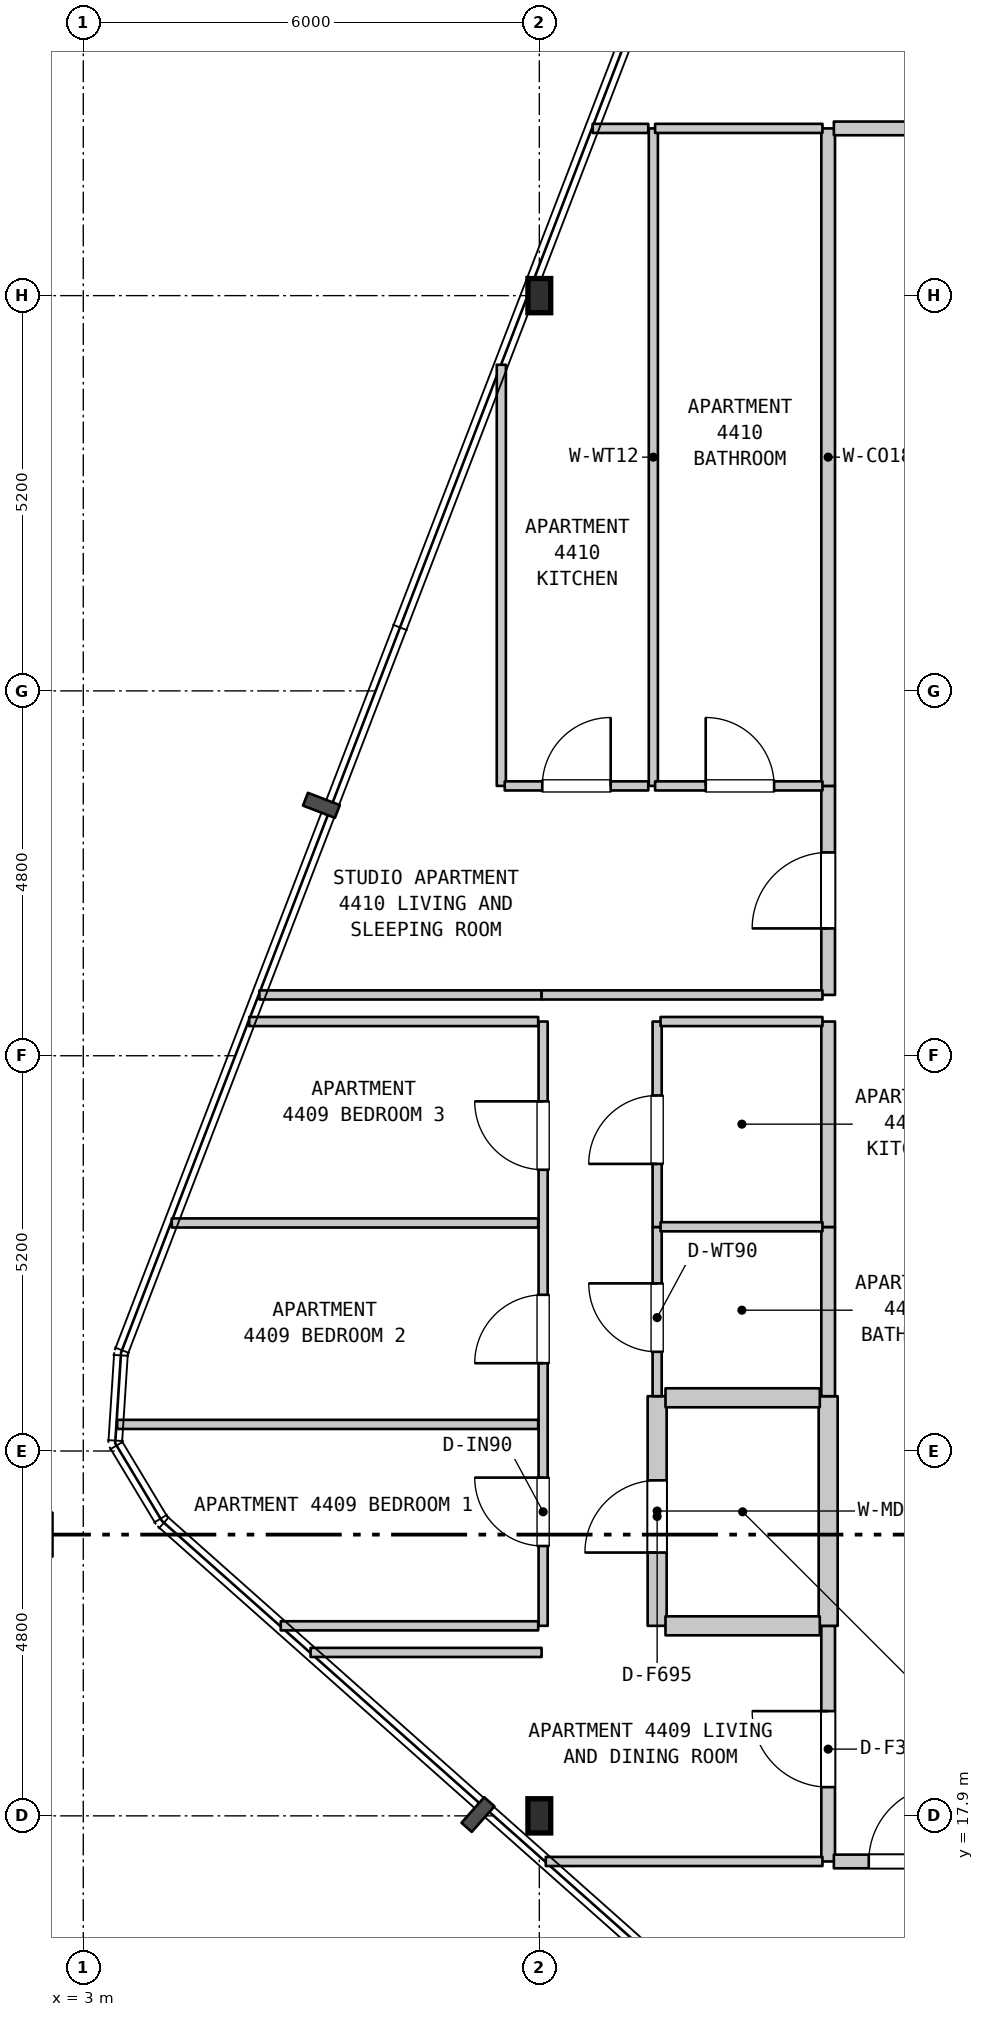
"""IFC4 building model, lengths in metres.
Left out: names, types, materials, properties, quantities, classifications, styles, units other than length and angle.
Written with IfcOpenShell. Run it as: python <this file> out.ifc"""

import sys

from ifc_helpers import new_model, si_unit, direction, frame, frame_2d, origin, origin_2d, place, context, subcontext, project, spatial, rectangle, i_section, extrude, element, fill, save


model = new_model("IFC4")
c1 = context("Model", 3, precision=1e-05, world=origin(), true_north=direction((0.0, 1.0)))
c2 = subcontext(c1, "Body", "Model", "MODEL_VIEW")
j1 = project(units=[si_unit("LENGTHUNIT", "METRE"), si_unit("PLANEANGLEUNIT", "RADIAN")], contexts=[c1])
p1 = place(None, origin())
s1 = spatial("IfcSite", under=j1, at=p1, CompositionType="ELEMENT")
p2 = place(p1, origin())
s2 = spatial("IfcBuilding", under=s1, at=p2, CompositionType="ELEMENT")
p3 = place(p2, frame((0.0, 0.0, 180.2)))
s3 = spatial("IfcBuildingStorey", under=s2, at=p3, CompositionType="ELEMENT", Elevation=180.2)
for number, where, z_axis, x_axis in (
    (1, (9.0, 17.9, 0.0), (0.0, 0.0, 1.0), (1.0, 0.0, 0.0)),
    (2, (9.0, 37.9, 0.0), (0.0, 0.0, 1.0), (1.0, 0.0, 0.0)),
):
    element("IfcColumn", number, at=place(p3, frame(where, z_axis=z_axis, x_axis=x_axis)), inside=s3, PredefinedType="COLUMN", context=c2, shape_type="SweptSolid", body=[
        extrude(i_section(OverallWidth=0.3, OverallDepth=0.45, WebThickness=0.014, FlangeThickness=0.026, FilletRadius=0.027, at=origin_2d()), origin(), (0.0, 0.0, 1.0), 3.7),
    ])
p4 = place(p3, frame((8.5, 31.45, 0.0), z_axis=(0.0, 0.0, 1.0), x_axis=(0.0, 1.0, 0.0)))
e3 = element("IfcWall", 3, at=p4, inside=s3, PredefinedType="PARTITIONING", context=c2, shape_type="SweptSolid", body=[
    extrude(rectangle(XDim=5.54, YDim=0.12, at=frame_2d((2.77, 0.0))), origin(), (0.0, 0.0, 1.0), 3.38),
])
p5 = place(p3, frame((9.05, 20.4, 0.0), z_axis=(0.0, 0.0, 1.0), x_axis=(0.0, 1.0, 0.0)))
e4 = element("IfcWall", 4, at=p5, inside=s3, PredefinedType="PARTITIONING", context=c2, shape_type="SweptSolid", body=[
    extrude(rectangle(XDim=7.95, YDim=0.12, at=frame_2d((3.975, 0.0))), origin(), (0.0, 0.0, 1.0), 2.78),
])
p6 = place(p5, frame((1.05, 0.0, 0.0)))
e5 = element("IfcOpeningElement", 5, at=p6, cuts=e4, PredefinedType="OPENING", context=c2, shape_type="SweptSolid", body=[
    extrude(rectangle(XDim=0.9, YDim=2.15, at=frame_2d((0.45, 1.075))), frame((0.0, 0.07, 0.0), z_axis=(0.0, -1.0, 0.0), x_axis=(1.0, 0.0, 0.0)), (0.0, 0.0, 1.0), 0.14),
])
p7 = place(p5, frame((3.455, 0.0, 0.0)))
e6 = element("IfcOpeningElement", 6, at=p7, cuts=e4, PredefinedType="OPENING", context=c2, shape_type="SweptSolid", body=[
    extrude(rectangle(XDim=0.9, YDim=2.15, at=frame_2d((0.45, 1.075))), frame((0.0, 0.07, 0.0), z_axis=(0.0, -1.0, 0.0), x_axis=(1.0, 0.0, 0.0)), (0.0, 0.0, 1.0), 0.14),
])
p8 = place(p5, frame((6.0, 0.0, 0.0)))
e7 = element("IfcOpeningElement", 7, at=p8, cuts=e4, PredefinedType="OPENING", context=c2, shape_type="SweptSolid", body=[
    extrude(rectangle(XDim=0.9, YDim=2.15, at=frame_2d((0.45, 1.075))), frame((0.0, 0.07, 0.0), z_axis=(0.0, -1.0, 0.0), x_axis=(1.0, 0.0, 0.0)), (0.0, 0.0, 1.0), 0.14),
])
p9 = place(p3, frame((10.5, 31.45, 0.0), z_axis=(0.0, 0.0, 1.0), x_axis=(0.0, 1.0, 0.0)))
e8 = element("IfcWall", 8, at=p9, inside=s3, PredefinedType="PARTITIONING", context=c2, shape_type="SweptSolid", body=[
    extrude(rectangle(XDim=8.65, YDim=0.12, at=frame_2d((4.325, 0.0))), origin(), (0.0, 0.0, 1.0), 3.38),
])
p10 = place(p3, frame((10.55, 20.4, 0.0), z_axis=(0.0, 0.0, 1.0), x_axis=(0.0, 1.0, 0.0)))
e9 = element("IfcWall", 9, at=p10, inside=s3, PredefinedType="STANDARD", context=c2, shape_type="SweptSolid", body=[
    extrude(rectangle(XDim=3.021, YDim=0.25, at=frame_2d((1.51, 0.0))), origin(), (0.0, 0.0, 1.0), 3.38),
])
p11 = place(p10, frame((0.964, 0.0, 0.0)))
e10 = element("IfcOpeningElement", 10, at=p11, cuts=e9, PredefinedType="OPENING", context=c2, shape_type="SweptSolid", body=[
    extrude(rectangle(XDim=0.95, YDim=2.15, at=frame_2d((0.475, 1.075))), frame((0.0, 0.135, 0.0), z_axis=(0.0, -1.0, 0.0), x_axis=(1.0, 0.0, 0.0)), (0.0, 0.0, 1.0), 0.27),
])
p12 = place(p3, frame((10.55, 23.421, 0.0), z_axis=(0.0, 0.0, 1.0), x_axis=(0.0, 1.0, 0.0)))
e11 = element("IfcWall", 11, at=p12, inside=s3, PredefinedType="PARTITIONING", context=c2, shape_type="SweptSolid", body=[
    extrude(rectangle(XDim=2.226, YDim=0.12, at=frame_2d((1.113, 0.0))), origin(), (0.0, 0.0, 1.0), 3.38),
])
p13 = place(p12, frame((0.584, 0.0, 0.0)))
e12 = element("IfcOpeningElement", 12, at=p13, cuts=e11, PredefinedType="OPENING", context=c2, shape_type="SweptSolid", body=[
    extrude(rectangle(XDim=0.9, YDim=2.1, at=frame_2d((0.45, 1.05))), frame((0.0, 0.07, 0.0), z_axis=(0.0, -1.0, 0.0), x_axis=(1.0, 0.0, 0.0)), (0.0, 0.0, 1.0), 0.14),
])
p14 = place(p3, frame((10.55, 25.647, 0.0), z_axis=(0.0, 0.0, 1.0), x_axis=(0.0, 1.0, 0.0)))
e13 = element("IfcWall", 13, at=p14, inside=s3, PredefinedType="PARTITIONING", context=c2, shape_type="SweptSolid", body=[
    extrude(rectangle(XDim=2.703, YDim=0.12, at=frame_2d((1.352, 0.0))), origin(), (0.0, 0.0, 1.0), 3.38),
])
p15 = place(p14, frame((0.83, 0.0, 0.0)))
e14 = element("IfcOpeningElement", 14, at=p15, cuts=e13, PredefinedType="OPENING", context=c2, shape_type="SweptSolid", body=[
    extrude(rectangle(XDim=0.9, YDim=2.15, at=frame_2d((0.45, 1.075))), frame((0.0, 0.07, 0.0), z_axis=(0.0, -1.0, 0.0), x_axis=(1.0, 0.0, 0.0)), (0.0, 0.0, 1.0), 0.14),
])
p16 = place(p3, frame((12.8, 17.3, 0.0), z_axis=(0.0, 0.0, 1.0), x_axis=(0.0, 1.0, 0.0)))
e15 = element("IfcWall", 15, at=p16, inside=s3, PredefinedType="STANDARD", context=c2, shape_type="SweptSolid", body=[
    extrude(rectangle(XDim=3.1, YDim=0.18, at=frame_2d((1.55, 0.0))), origin(), (0.0, 0.0, 1.0), 3.38),
])
p17 = place(p16, frame((0.978, 0.0, 0.0)))
e16 = element("IfcOpeningElement", 16, at=p17, cuts=e15, PredefinedType="OPENING", context=c2, shape_type="SweptSolid", body=[
    extrude(rectangle(XDim=1.0, YDim=2.15, at=frame_2d((0.5, 1.075))), frame((0.0, 0.1, 0.0), z_axis=(0.0, -1.0, 0.0), x_axis=(1.0, 0.0, 0.0)), (0.0, 0.0, 1.0), 0.2),
])
p18 = place(p3, frame((12.8, 20.4, 0.0), z_axis=(0.0, 0.0, 1.0), x_axis=(0.0, 1.0, 0.0)))
e17 = element("IfcWall", 17, at=p18, inside=s3, PredefinedType="STANDARD", context=c2, shape_type="SweptSolid", body=[
    extrude(rectangle(XDim=3.021, YDim=0.25, at=frame_2d((1.51, 0.0))), origin(), (0.0, 0.0, 1.0), 3.38),
])
p19 = place(p3, frame((12.8, 23.421, 0.0), z_axis=(0.0, 0.0, 1.0), x_axis=(0.0, 1.0, 0.0)))
e18 = element("IfcWall", 18, at=p19, inside=s3, PredefinedType="STANDARD", context=c2, shape_type="SweptSolid", body=[
    extrude(rectangle(XDim=2.226, YDim=0.18, at=frame_2d((1.113, 0.0))), origin(), (0.0, 0.0, 1.0), 3.38),
])
p20 = place(p3, frame((12.8, 25.647, 0.0), z_axis=(0.0, 0.0, 1.0), x_axis=(0.0, 1.0, 0.0)))
e19 = element("IfcWall", 19, at=p20, inside=s3, PredefinedType="STANDARD", context=c2, shape_type="SweptSolid", body=[
    extrude(rectangle(XDim=2.703, YDim=0.18, at=frame_2d((1.352, 0.0))), origin(), (0.0, 0.0, 1.0), 3.38),
])
p21 = place(p3, frame((12.8, 28.7, 0.0), z_axis=(0.0, 0.0, 1.0), x_axis=(0.0, 1.0, 0.0)))
e20 = element("IfcWall", 20, at=p21, inside=s3, PredefinedType="STANDARD", context=c2, shape_type="SweptSolid", body=[
    extrude(rectangle(XDim=2.75, YDim=0.18, at=frame_2d((1.375, 0.0))), origin(), (0.0, 0.0, 1.0), 3.38),
])
p22 = place(p21, frame((0.875, 0.0, 0.0)))
e21 = element("IfcOpeningElement", 21, at=p22, cuts=e20, PredefinedType="OPENING", context=c2, shape_type="SweptSolid", body=[
    extrude(rectangle(XDim=1.0, YDim=2.15, at=frame_2d((0.5, 1.075))), frame((0.0, 0.1, 0.0), z_axis=(0.0, -1.0, 0.0), x_axis=(1.0, 0.0, 0.0)), (0.0, 0.0, 1.0), 0.2),
])
p23 = place(p3, frame((12.8, 31.45, 0.0), z_axis=(0.0, 0.0, 1.0), x_axis=(0.0, 1.0, 0.0)))
e22 = element("IfcWall", 22, at=p23, inside=s3, PredefinedType="STANDARD", context=c2, shape_type="SweptSolid", body=[
    extrude(rectangle(XDim=8.65, YDim=0.18, at=frame_2d((4.325, 0.0))), origin(), (0.0, 0.0, 1.0), 3.38),
])
p24 = place(p3, frame((9.085, 17.3, 0.0), z_axis=(0.0, 0.0, 1.0), x_axis=(1.0, 0.0, 0.0)))
e23 = element("IfcWall", 23, at=p24, inside=s3, PredefinedType="PARTITIONING", context=c2, shape_type="SweptSolid", body=[
    extrude(rectangle(XDim=3.64, YDim=0.12, at=frame_2d((1.82, 0.0))), origin(), (0.0, 0.0, 1.0), 3.38),
])
p25 = place(p3, frame((12.875, 17.3, 0.0), z_axis=(0.0, 0.0, 1.0), x_axis=(1.0, 0.0, 0.0)))
e24 = element("IfcWall", 24, at=p25, inside=s3, PredefinedType="STANDARD", context=c2, shape_type="SweptSolid", body=[
    extrude(rectangle(XDim=3.5, YDim=0.18, at=frame_2d((1.75, 0.0))), origin(), (0.0, 0.0, 1.0), 3.38),
])
p26 = place(p25, frame((0.459, 0.0, 0.0)))
e25 = element("IfcOpeningElement", 25, at=p26, cuts=e24, PredefinedType="OPENING", context=c2, shape_type="SweptSolid", body=[
    extrude(rectangle(XDim=1.0, YDim=2.15, at=frame_2d((0.5, 1.075))), frame((0.0, 0.1, 0.0), z_axis=(0.0, -1.0, 0.0), x_axis=(1.0, 0.0, 0.0)), (0.0, 0.0, 1.0), 0.2),
])
p27 = place(p3, frame((5.991, 20.05, 0.0), z_axis=(0.0, 0.0, 1.0), x_axis=(1.0, 0.0, 0.0)))
e26 = element("IfcWall", 26, at=p27, inside=s3, PredefinedType="PARTITIONING", context=c2, shape_type="SweptSolid", body=[
    extrude(rectangle(XDim=3.039, YDim=0.12, at=frame_2d((1.52, 0.0))), origin(), (0.0, 0.0, 1.0), 3.38),
])
p28 = place(p3, frame((5.598, 20.4, 0.0), z_axis=(0.0, 0.0, 1.0), x_axis=(1.0, 0.0, 0.0)))
e27 = element("IfcWall", 27, at=p28, inside=s3, PredefinedType="PARTITIONING", context=c2, shape_type="SweptSolid", body=[
    extrude(rectangle(XDim=3.387, YDim=0.12, at=frame_2d((1.694, 0.0))), origin(), (0.0, 0.0, 1.0), 3.38),
])
p29 = place(p3, frame((10.66, 20.4, 0.0), z_axis=(0.0, 0.0, 1.0), x_axis=(1.0, 0.0, 0.0)))
e28 = element("IfcWall", 28, at=p29, inside=s3, PredefinedType="STANDARD", context=c2, shape_type="SweptSolid", body=[
    extrude(rectangle(XDim=2.03, YDim=0.25, at=frame_2d((1.015, 0.0))), origin(), (0.0, 0.0, 1.0), 3.38),
])
p30 = place(p3, frame((3.446, 23.05, 0.0), z_axis=(0.0, 0.0, 1.0), x_axis=(1.0, 0.0, 0.0)))
e29 = element("IfcWall", 29, at=p30, inside=s3, PredefinedType="PARTITIONING", context=c2, shape_type="SweptSolid", body=[
    extrude(rectangle(XDim=5.539, YDim=0.12, at=frame_2d((2.77, 0.0))), origin(), (0.0, 0.0, 1.0), 3.38),
])
p31 = place(p3, frame((10.66, 23.4, 0.0), z_axis=(0.0, 0.0, 1.0), x_axis=(1.0, 0.0, 0.0)))
e30 = element("IfcWall", 30, at=p31, inside=s3, PredefinedType="STANDARD", context=c2, shape_type="SweptSolid", body=[
    extrude(rectangle(XDim=2.03, YDim=0.25, at=frame_2d((1.015, 0.0))), origin(), (0.0, 0.0, 1.0), 3.38),
])
p32 = place(p3, frame((10.595, 25.65, 0.0), z_axis=(0.0, 0.0, 1.0), x_axis=(1.0, 0.0, 0.0)))
e31 = element("IfcWall", 31, at=p32, inside=s3, PredefinedType="PARTITIONING", context=c2, shape_type="SweptSolid", body=[
    extrude(rectangle(XDim=2.13, YDim=0.12, at=frame_2d((1.065, 0.0))), origin(), (0.0, 0.0, 1.0), 3.38),
])
p33 = place(p3, frame((4.164, 25.7, 0.0), z_axis=(0.0, 0.0, 1.0), x_axis=(1.0, 0.0, 0.0)))
e32 = element("IfcWall", 32, at=p33, inside=s3, PredefinedType="PARTITIONING", context=c2, shape_type="SweptSolid", body=[
    extrude(rectangle(XDim=4.821, YDim=0.12, at=frame_2d((2.411, 0.0))), origin(), (0.0, 0.0, 1.0), 3.38),
])
p34 = place(p3, frame((5.183, 28.35, 0.0), z_axis=(0.0, 0.0, 1.0), x_axis=(1.0, 0.0, 0.0)))
e33 = element("IfcWall", 33, at=p34, inside=s3, PredefinedType="PARTITIONING", context=c2, shape_type="SweptSolid", body=[
    extrude(rectangle(XDim=3.802, YDim=0.12, at=frame_2d((1.901, 0.0))), origin(), (0.0, 0.0, 1.0), 3.38),
])
p35 = place(p3, frame((10.595, 28.35, 0.0), z_axis=(0.0, 0.0, 1.0), x_axis=(1.0, 0.0, 0.0)))
e34 = element("IfcWall", 34, at=p35, inside=s3, PredefinedType="PARTITIONING", context=c2, shape_type="SweptSolid", body=[
    extrude(rectangle(XDim=2.13, YDim=0.12, at=frame_2d((1.065, 0.0))), origin(), (0.0, 0.0, 1.0), 3.38),
])
p36 = place(p3, frame((5.317, 28.7, 0.0), z_axis=(0.0, 0.0, 1.0), x_axis=(1.0, 0.0, 0.0)))
e35 = element("IfcWall", 35, at=p36, inside=s3, PredefinedType="PARTITIONING", context=c2, shape_type="SweptSolid", body=[
    extrude(rectangle(XDim=3.713, YDim=0.12, at=frame_2d((1.856, 0.0))), origin(), (0.0, 0.0, 1.0), 3.38),
])
p37 = place(p3, frame((9.03, 28.7, 0.0), z_axis=(0.0, 0.0, 1.0), x_axis=(1.0, 0.0, 0.0)))
e36 = element("IfcWall", 36, at=p37, inside=s3, PredefinedType="PARTITIONING", context=c2, shape_type="SweptSolid", body=[
    extrude(rectangle(XDim=3.695, YDim=0.12, at=frame_2d((1.848, 0.0))), origin(), (0.0, 0.0, 1.0), 3.38),
])
p38 = place(p3, frame((8.545, 31.45, 0.0), z_axis=(0.0, 0.0, 1.0), x_axis=(1.0, 0.0, 0.0)))
e37 = element("IfcWall", 37, at=p38, inside=s3, PredefinedType="PARTITIONING", context=c2, shape_type="SweptSolid", body=[
    extrude(rectangle(XDim=1.888, YDim=0.12, at=frame_2d((0.944, 0.0))), origin(), (0.0, 0.0, 1.0), 3.38),
])
p39 = place(p38, frame((0.494, 0.0, 0.0)))
e38 = element("IfcOpeningElement", 38, at=p39, cuts=e37, PredefinedType="OPENING", context=c2, shape_type="SweptSolid", body=[
    extrude(rectangle(XDim=0.9, YDim=2.15, at=frame_2d((0.45, 1.075))), frame((0.0, 0.07, 0.0), z_axis=(0.0, -1.0, 0.0), x_axis=(1.0, 0.0, 0.0)), (0.0, 0.0, 1.0), 0.14),
])
p40 = place(p3, frame((10.523, 31.45, 0.0), z_axis=(0.0, 0.0, 1.0), x_axis=(1.0, 0.0, 0.0)))
e39 = element("IfcWall", 39, at=p40, inside=s3, PredefinedType="PARTITIONING", context=c2, shape_type="SweptSolid", body=[
    extrude(rectangle(XDim=2.202, YDim=0.12, at=frame_2d((1.101, 0.0))), origin(), (0.0, 0.0, 1.0), 3.38),
])
p41 = place(p40, frame((0.666, 0.0, 0.0)))
e40 = element("IfcOpeningElement", 40, at=p41, cuts=e39, PredefinedType="OPENING", context=c2, shape_type="SweptSolid", body=[
    extrude(rectangle(XDim=0.9, YDim=2.1, at=frame_2d((0.45, 1.05))), frame((0.0, 0.07, 0.0), z_axis=(0.0, -1.0, 0.0), x_axis=(1.0, 0.0, 0.0)), (0.0, 0.0, 1.0), 0.14),
])
p42 = place(p3, frame((9.702, 40.1, 0.0), z_axis=(0.0, 0.0, 1.0), x_axis=(1.0, 0.0, 0.0)))
e41 = element("IfcWall", 41, at=p42, inside=s3, PredefinedType="PARTITIONING", context=c2, shape_type="SweptSolid", body=[
    extrude(rectangle(XDim=0.731, YDim=0.12, at=frame_2d((0.366, 0.0))), origin(), (0.0, 0.0, 1.0), 3.38),
])
p43 = place(p3, frame((10.523, 40.1, 0.0), z_axis=(0.0, 0.0, 1.0), x_axis=(1.0, 0.0, 0.0)))
e42 = element("IfcWall", 42, at=p43, inside=s3, PredefinedType="PARTITIONING", context=c2, shape_type="SweptSolid", body=[
    extrude(rectangle(XDim=2.202, YDim=0.12, at=frame_2d((1.101, 0.0))), origin(), (0.0, 0.0, 1.0), 3.38),
])
p44 = place(p3, frame((12.875, 40.1, 0.0), z_axis=(0.0, 0.0, 1.0), x_axis=(1.0, 0.0, 0.0)))
e43 = element("IfcWall", 43, at=p44, inside=s3, PredefinedType="STANDARD", context=c2, shape_type="SweptSolid", body=[
    extrude(rectangle(XDim=1.33, YDim=0.18, at=frame_2d((0.665, 0.0))), origin(), (0.0, 0.0, 1.0), 3.38),
])
p45 = place(p6, origin())
e44 = element("IfcDoor", 44, at=p45, inside=s3, OperationType="SINGLE_SWING_RIGHT", PredefinedType="DOOR", context=c2, shape_type="SweptSolid", body=[
    extrude(rectangle(XDim=0.9, YDim=2.15, at=frame_2d((0.45, 1.075))), frame((0.0, 0.025, 0.0), z_axis=(0.0, -1.0, 0.0), x_axis=(1.0, 0.0, 0.0)), (0.0, 0.0, 1.0), 0.05),
])
fill(e5, e44)
p46 = place(p7, origin())
e45 = element("IfcDoor", 45, at=p46, inside=s3, OperationType="SINGLE_SWING_LEFT", PredefinedType="DOOR", context=c2, shape_type="SweptSolid", body=[
    extrude(rectangle(XDim=0.9, YDim=2.15, at=frame_2d((0.45, 1.075))), frame((0.0, 0.025, 0.0), z_axis=(0.0, -1.0, 0.0), x_axis=(1.0, 0.0, 0.0)), (0.0, 0.0, 1.0), 0.05),
])
fill(e6, e45)
p47 = place(p8, origin())
e46 = element("IfcDoor", 46, at=p47, inside=s3, OperationType="SINGLE_SWING_RIGHT", PredefinedType="DOOR", context=c2, shape_type="SweptSolid", body=[
    extrude(rectangle(XDim=0.9, YDim=2.15, at=frame_2d((0.45, 1.075))), frame((0.0, 0.025, 0.0), z_axis=(0.0, -1.0, 0.0), x_axis=(1.0, 0.0, 0.0)), (0.0, 0.0, 1.0), 0.05),
])
fill(e7, e46)
p48 = place(p11, origin())
e47 = element("IfcDoor", 47, at=p48, inside=s3, OperationType="SINGLE_SWING_LEFT", PredefinedType="DOOR", context=c2, shape_type="SweptSolid", body=[
    extrude(rectangle(XDim=0.95, YDim=2.15, at=frame_2d((0.475, 1.075))), frame((0.0, 0.025, 0.0), z_axis=(0.0, -1.0, 0.0), x_axis=(1.0, 0.0, 0.0)), (0.0, 0.0, 1.0), 0.05),
])
fill(e10, e47)
p49 = place(p13, origin())
e48 = element("IfcDoor", 48, at=p49, inside=s3, OperationType="SINGLE_SWING_RIGHT", PredefinedType="DOOR", context=c2, shape_type="SweptSolid", body=[
    extrude(rectangle(XDim=0.9, YDim=2.1, at=frame_2d((0.45, 1.05))), frame((0.0, 0.025, 0.0), z_axis=(0.0, -1.0, 0.0), x_axis=(1.0, 0.0, 0.0)), (0.0, 0.0, 1.0), 0.05),
])
fill(e12, e48)
p50 = place(p15, origin())
e49 = element("IfcDoor", 49, at=p50, inside=s3, OperationType="SINGLE_SWING_LEFT", PredefinedType="DOOR", context=c2, shape_type="SweptSolid", body=[
    extrude(rectangle(XDim=0.9, YDim=2.15, at=frame_2d((0.45, 1.075))), frame((0.0, 0.025, 0.0), z_axis=(0.0, -1.0, 0.0), x_axis=(1.0, 0.0, 0.0)), (0.0, 0.0, 1.0), 0.05),
])
fill(e14, e49)
p51 = place(p17, origin())
e50 = element("IfcDoor", 50, at=p51, inside=s3, OperationType="SINGLE_SWING_RIGHT", PredefinedType="DOOR", context=c2, shape_type="SweptSolid", body=[
    extrude(rectangle(XDim=1.0, YDim=2.15, at=frame_2d((0.5, 1.075))), frame((0.0, 0.025, 0.0), z_axis=(0.0, -1.0, 0.0), x_axis=(1.0, 0.0, 0.0)), (0.0, 0.0, 1.0), 0.05),
])
fill(e16, e50)
p52 = place(p22, origin())
e51 = element("IfcDoor", 51, at=p52, inside=s3, OperationType="SINGLE_SWING_LEFT", PredefinedType="DOOR", context=c2, shape_type="SweptSolid", body=[
    extrude(rectangle(XDim=1.0, YDim=2.15, at=frame_2d((0.5, 1.075))), frame((0.0, 0.025, 0.0), z_axis=(0.0, -1.0, 0.0), x_axis=(1.0, 0.0, 0.0)), (0.0, 0.0, 1.0), 0.05),
])
fill(e21, e51)
p53 = place(p26, origin())
e52 = element("IfcDoor", 52, at=p53, inside=s3, OperationType="SINGLE_SWING_RIGHT", PredefinedType="DOOR", context=c2, shape_type="SweptSolid", body=[
    extrude(rectangle(XDim=1.0, YDim=2.15, at=frame_2d((0.5, 1.075))), frame((0.0, 0.025, 0.0), z_axis=(0.0, -1.0, 0.0), x_axis=(1.0, 0.0, 0.0)), (0.0, 0.0, 1.0), 0.05),
])
fill(e25, e52)
p54 = place(p39, origin())
e53 = element("IfcDoor", 53, at=p54, inside=s3, OperationType="SINGLE_SWING_RIGHT", PredefinedType="DOOR", context=c2, shape_type="SweptSolid", body=[
    extrude(rectangle(XDim=0.9, YDim=2.15, at=frame_2d((0.45, 1.075))), frame((0.0, 0.025, 0.0), z_axis=(0.0, -1.0, 0.0), x_axis=(1.0, 0.0, 0.0)), (0.0, 0.0, 1.0), 0.05),
])
fill(e38, e53)
p55 = place(p41, origin())
e54 = element("IfcDoor", 54, at=p55, inside=s3, OperationType="SINGLE_SWING_LEFT", PredefinedType="DOOR", context=c2, shape_type="SweptSolid", body=[
    extrude(rectangle(XDim=0.9, YDim=2.1, at=frame_2d((0.45, 1.05))), frame((0.0, 0.025, 0.0), z_axis=(0.0, -1.0, 0.0), x_axis=(1.0, 0.0, 0.0)), (0.0, 0.0, 1.0), 0.05),
])
fill(e40, e54)
save(model, sys.argv[1])
